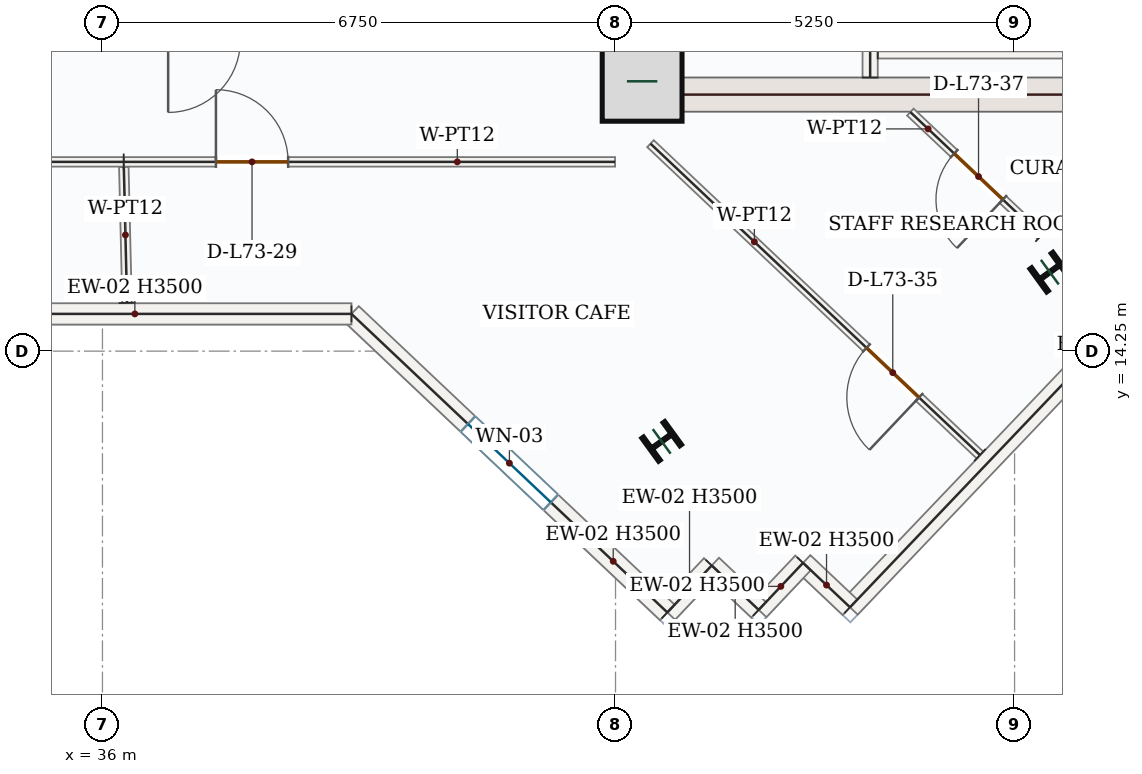
"""IFC4 building model, lengths in metres.
Left out: names, types, materials, properties, quantities, classifications, styles, units other than length and angle.
Written with IfcOpenShell. Run it as: python <this file> out.ifc"""

import sys

from ifc_helpers import new_model, si_unit, direction, frame, frame_2d, origin, origin_2d, place, context, subcontext, project, spatial, rectangle, i_section, extrude, source, transform, mapped, element, fill, save


model = new_model("IFC4")
c1 = context("Model", 3, precision=1e-05, world=origin(), true_north=direction((0.0, 1.0)))
c2 = subcontext(c1, "Body", "Model", "MODEL_VIEW")
j1 = project(units=[si_unit("LENGTHUNIT", "METRE"), si_unit("PLANEANGLEUNIT", "RADIAN")], contexts=[c1])
p1 = place(None, origin())
s1 = spatial("IfcSite", under=j1, at=p1, CompositionType="ELEMENT")
p2 = place(p1, origin())
s2 = spatial("IfcBuilding", under=s1, at=p2, CompositionType="ELEMENT")
p3 = place(p2, frame((0.0, 0.0, 302.85)))
s3 = spatial("IfcBuildingStorey", under=s2, at=p3, CompositionType="ELEMENT", Elevation=302.85)
p4 = place(p3, frame((42.975, 17.4, 0.0), z_axis=(0.0, 0.0, 1.0), x_axis=(0.0, 1.0, 0.0)))
e1 = element("IfcWall", 1, at=p4, inside=s3, PredefinedType="SHEAR", context=c2, shape_type="SweptSolid", body=[
    extrude(rectangle(XDim=8.55, YDim=0.45, at=frame_2d((4.275, 0.0))), origin(), (0.0, 0.0, 1.0), 3.5),
])
p5 = place(p4, frame((6.65, 0.0, 0.0)))
e2 = element("IfcOpeningElement", 2, at=p5, cuts=e1, PredefinedType="OPENING", context=c2, shape_type="SweptSolid", body=[
    extrude(rectangle(XDim=1.1, YDim=2.2, at=frame_2d((0.55, 1.1))), frame((0.0, 0.235, 0.0), z_axis=(0.0, -1.0, 0.0), x_axis=(1.0, 0.0, 0.0)), (0.0, 0.0, 1.0), 0.47),
])
p6 = place(p4, frame((1.75, 0.0, 0.0)))
e3 = element("IfcOpeningElement", 3, at=p6, cuts=e1, PredefinedType="OPENING", context=c2, shape_type="SweptSolid", body=[
    extrude(rectangle(XDim=1.3, YDim=2.2, at=frame_2d((0.65, 1.1))), frame((0.0, 0.235, 0.0), z_axis=(0.0, -1.0, 0.0), x_axis=(1.0, 0.0, 0.0)), (0.0, 0.0, 1.0), 0.47),
])
p7 = place(p4, frame((4.3, 0.0, 0.0)))
e4 = element("IfcOpeningElement", 4, at=p7, cuts=e1, PredefinedType="OPENING", context=c2, shape_type="SweptSolid", body=[
    extrude(rectangle(XDim=0.88, YDim=2.1, at=frame_2d((0.44, 1.05))), frame((0.0, 0.235, 0.0), z_axis=(0.0, -1.0, 0.0), x_axis=(1.0, 0.0, 0.0)), (0.0, 0.0, 1.0), 0.47),
])
m1 = source(origin(), c2, "Body", "SweptSolid", [
    extrude(rectangle(XDim=7.1, YDim=0.45, at=frame_2d((3.55, 0.0))), origin(), (0.0, 0.0, 1.0), 3.5),
])
p8 = place(p3, frame((43.2, 17.625, 0.0), z_axis=(0.0, 0.0, 1.0), x_axis=(1.0, 0.0, 0.0)))
e5 = element("IfcWall", 5, at=p8, inside=s3, PredefinedType="SHEAR", context=c2, shape_type="MappedRepresentation", body=[
    mapped(m1, transform((0.0, 0.0, 0.0), x_axis=(1.0, 0.0, 0.0), y_axis=(0.0, 1.0, 0.0), z_axis=(0.0, 0.0, 1.0), scale=1.0)),
])
m2 = source(origin(), c2, "Body", "SweptSolid", [
    extrude(rectangle(XDim=1.05, YDim=1.05, at=origin_2d()), origin(), (0.0, 0.0, 1.0), 3.75),
])
p9 = place(p3, frame((43.1, 17.8, 0.0), z_axis=(0.0, 0.0, 1.0), x_axis=(1.0, 0.0, 0.0)))
e6 = element("IfcColumn", 6, at=p9, inside=s3, PredefinedType="COLUMN", context=c2, shape_type="MappedRepresentation", body=[
    mapped(m2, transform((0.0, 0.0, 0.0), x_axis=(1.0, 0.0, 0.0), y_axis=(0.0, 1.0, 0.0), z_axis=(0.0, 0.0, 1.0), scale=1.0)),
])
m3 = source(origin(), c2, "Body", "SweptSolid", [
    extrude(i_section(OverallWidth=0.374, OverallDepth=0.372, WebThickness=0.016, FlangeThickness=0.026, FilletRadius=0.018, at=origin_2d()), origin(), (0.0, 0.0, 1.0), 3.75),
])
for number, where, z_axis, x_axis in (
    (7, (43.357, 13.063, 0.0), (0.0, 0.0, 1.0), (-0.588, 0.809, 0.0)),
    (8, (48.464, 15.289, 0.0), (0.0, 0.0, 1.0), (-0.588, 0.809, 0.0)),
):
    element("IfcColumn", number, at=place(p3, frame(where, z_axis=z_axis, x_axis=x_axis)), inside=s3, PredefinedType="COLUMN", context=c2, shape_type="MappedRepresentation", body=[
        mapped(m3, transform((0.0, 0.0, 0.0), x_axis=(1.0, 0.0, 0.0), y_axis=(0.0, 1.0, 0.0), z_axis=(0.0, 0.0, 1.0), scale=1.0)),
    ])
m4 = source(origin(), c2, "Body", "SweptSolid", [
    extrude(rectangle(XDim=10.47, YDim=0.28, at=frame_2d((5.235, 0.0))), origin(), (0.0, 0.0, 1.0), 3.5),
])
p10 = place(p3, frame((53.06, 18.458, 0.0), z_axis=(0.0, 0.0, 1.0), x_axis=(-0.690070788875, -0.723741878256, 0.0)))
e9 = element("IfcWall", 9, at=p10, inside=s3, PredefinedType="SOLIDWALL", context=c2, shape_type="MappedRepresentation", body=[
    mapped(m4, transform((0.0, 0.0, 0.0), x_axis=(1.0, 0.0, 0.0), y_axis=(0.0, 1.0, 0.0), z_axis=(0.0, 0.0, 1.0), scale=1.0)),
])
m5 = source(origin(), c2, "Body", "SweptSolid", [
    extrude(rectangle(XDim=0.85, YDim=0.28, at=frame_2d((0.425, 0.0))), origin(), (0.0, 0.0, 1.0), 3.5),
])
p11 = place(p3, frame((45.835, 10.88, 0.0), z_axis=(0.0, 0.0, 1.0), x_axis=(-0.726790047388, 0.686859685101, 0.0)))
e10 = element("IfcWall", 10, at=p11, inside=s3, PredefinedType="SOLIDWALL", context=c2, shape_type="MappedRepresentation", body=[
    mapped(m5, transform((0.0, 0.0, 0.0), x_axis=(1.0, 0.0, 0.0), y_axis=(0.0, 1.0, 0.0), z_axis=(0.0, 0.0, 1.0), scale=1.0)),
])
m6 = source(origin(), c2, "Body", "SweptSolid", [
    extrude(rectangle(XDim=0.85, YDim=0.28, at=frame_2d((0.425, 0.0))), origin(), (0.0, 0.0, 1.0), 3.5),
])
p12 = place(p3, frame((45.217, 11.464, 0.0), z_axis=(0.0, 0.0, 1.0), x_axis=(-0.687011382404, -0.726646654466, 0.0)))
e11 = element("IfcWall", 11, at=p12, inside=s3, PredefinedType="SOLIDWALL", context=c2, shape_type="MappedRepresentation", body=[
    mapped(m6, transform((0.0, 0.0, 0.0), x_axis=(1.0, 0.0, 0.0), y_axis=(0.0, 1.0, 0.0), z_axis=(0.0, 0.0, 1.0), scale=1.0)),
])
p13 = place(p3, frame((44.633, 10.846, 0.0), z_axis=(0.0, 0.0, 1.0), x_axis=(-0.726790047388, 0.686859685101, 0.0)))
e12 = element("IfcWall", 12, at=p13, inside=s3, PredefinedType="SOLIDWALL", context=c2, shape_type="MappedRepresentation", body=[
    mapped(m5, transform((0.0, 0.0, 0.0), x_axis=(1.0, 0.0, 0.0), y_axis=(0.0, 1.0, 0.0), z_axis=(0.0, 0.0, 1.0), scale=1.0)),
])
p14 = place(p3, frame((44.016, 11.43, 0.0), z_axis=(0.0, 0.0, 1.0), x_axis=(-0.687011382404, -0.726646654466, 0.0)))
e13 = element("IfcWall", 13, at=p14, inside=s3, PredefinedType="SOLIDWALL", context=c2, shape_type="MappedRepresentation", body=[
    mapped(m6, transform((0.0, 0.0, 0.0), x_axis=(1.0, 0.0, 0.0), y_axis=(0.0, 1.0, 0.0), z_axis=(0.0, 0.0, 1.0), scale=1.0)),
])
p15 = place(p3, frame((43.432, 10.812, 0.0), z_axis=(0.0, 0.0, 1.0), x_axis=(-0.726765623086, 0.686885528382, 0.0)))
e14 = element("IfcWall", 14, at=p15, inside=s3, PredefinedType="SOLIDWALL", context=c2, shape_type="SweptSolid", body=[
    extrude(rectangle(XDim=5.718, YDim=0.28, at=frame_2d((2.859, 0.0))), origin(), (0.0, 0.0, 1.0), 3.5),
])
p16 = place(p15, frame((2.109, 0.0, 0.85)))
e15 = element("IfcOpeningElement", 15, at=p16, cuts=e14, PredefinedType="OPENING", context=c2, shape_type="SweptSolid", body=[
    extrude(rectangle(XDim=1.5, YDim=1.5, at=frame_2d((0.75, 0.75))), frame((0.0, 0.15, 0.0), z_axis=(0.0, -1.0, 0.0), x_axis=(1.0, 0.0, 0.0)), (0.0, 0.0, 1.0), 0.3),
])
m7 = source(origin(), c2, "Body", "SweptSolid", [
    extrude(rectangle(XDim=5.699, YDim=0.28, at=frame_2d((2.85, 0.0))), origin(), (0.0, 0.0, 1.0), 3.5),
])
p17 = place(p3, frame((39.276, 14.74, 0.0), z_axis=(0.0, 0.0, 1.0), x_axis=(-1.0, 0.0, 0.0)))
e16 = element("IfcWall", 16, at=p17, inside=s3, PredefinedType="SOLIDWALL", context=c2, shape_type="MappedRepresentation", body=[
    mapped(m7, transform((0.0, 0.0, 0.0), x_axis=(1.0, 0.0, 0.0), y_axis=(0.0, 1.0, 0.0), z_axis=(0.0, 0.0, 1.0), scale=1.0)),
])
p18 = place(p3, frame((46.1, 17.85, 0.0), z_axis=(0.0, 0.0, 1.0), x_axis=(0.0, 1.0, 0.0)))
e17 = element("IfcWall", 17, at=p18, inside=s3, PredefinedType="SOLIDWALL", context=c2, shape_type="SweptSolid", body=[
    extrude(rectangle(XDim=8.0, YDim=0.2, at=frame_2d((4.0, 0.0))), origin(), (0.0, 0.0, 1.0), 3.5),
])
p19 = place(p18, frame((6.3, 0.0, 0.0)))
e18 = element("IfcOpeningElement", 18, at=p19, cuts=e17, PredefinedType="OPENING", context=c2, shape_type="SweptSolid", body=[
    extrude(rectangle(XDim=1.05, YDim=2.15, at=frame_2d((0.525, 1.075))), frame((0.0, 0.11, 0.0), z_axis=(0.0, -1.0, 0.0), x_axis=(1.0, 0.0, 0.0)), (0.0, 0.0, 1.0), 0.22),
])
m8 = source(origin(), c2, "Body", "SweptSolid", [
    extrude(rectangle(XDim=3.25, YDim=0.2, at=frame_2d((1.625, 0.0))), origin(), (0.0, 0.0, 1.0), 3.5),
])
p20 = place(p3, frame((46.2, 18.2, 0.0), z_axis=(0.0, 0.0, 1.0), x_axis=(1.0, 0.0, 0.0)))
e19 = element("IfcWall", 19, at=p20, inside=s3, PredefinedType="SOLIDWALL", context=c2, shape_type="MappedRepresentation", body=[
    mapped(m8, transform((0.0, 0.0, 0.0), x_axis=(1.0, 0.0, 0.0), y_axis=(0.0, 1.0, 0.0), z_axis=(0.0, 0.0, 1.0), scale=1.0)),
])
p21 = place(p3, frame((48.349, 15.769, 0.0), z_axis=(0.0, 0.0, 1.0), x_axis=(-0.726735597886, 0.686917295433, 0.0)))
e20 = element("IfcWall", 20, at=p21, inside=s3, PredefinedType="PARTITIONING", context=c2, shape_type="SweptSolid", body=[
    extrude(rectangle(XDim=2.367, YDim=0.125, at=frame_2d((1.183, 0.0))), origin(), (0.0, 0.0, 1.0), 3.5),
])
p22 = place(p21, frame((0.692, 0.0, 0.0)))
e21 = element("IfcOpeningElement", 21, at=p22, cuts=e20, PredefinedType="OPENING", context=c2, shape_type="SweptSolid", body=[
    extrude(rectangle(XDim=0.88, YDim=2.1, at=frame_2d((0.44, 1.05))), frame((0.0, 0.073, 0.0), z_axis=(0.0, -1.0, 0.0), x_axis=(1.0, 0.0, 0.0)), (0.0, 0.0, 1.0), 0.145),
])
p23 = place(p3, frame((47.544, 12.883, 0.0), z_axis=(0.0, 0.0, 1.0), x_axis=(-0.726761082497, 0.686890332562, 0.0)))
e22 = element("IfcWall", 22, at=p23, inside=s3, PredefinedType="PARTITIONING", context=c2, shape_type="SweptSolid", body=[
    extrude(rectangle(XDim=5.964, YDim=0.125, at=frame_2d((2.982, 0.0))), origin(), (0.0, 0.0, 1.0), 3.5),
])
p24 = place(p23, frame((1.103, 0.0, 0.0)))
e23 = element("IfcOpeningElement", 23, at=p24, cuts=e22, PredefinedType="OPENING", context=c2, shape_type="SweptSolid", body=[
    extrude(rectangle(XDim=0.95, YDim=2.15, at=frame_2d((0.475, 1.075))), frame((0.0, 0.073, 0.0), z_axis=(0.0, -1.0, 0.0), x_axis=(1.0, 0.0, 0.0)), (0.0, 0.0, 1.0), 0.145),
])
p25 = place(p3, frame((36.28, 16.74, 0.0), z_axis=(0.0, 0.0, 1.0), x_axis=(1.0, 0.0, 0.0)))
e24 = element("IfcWall", 24, at=p25, inside=s3, PredefinedType="PARTITIONING", context=c2, shape_type="SweptSolid", body=[
    extrude(rectangle(XDim=6.464, YDim=0.125, at=frame_2d((3.232, 0.0))), origin(), (0.0, 0.0, 1.0), 3.5),
])
p26 = place(p25, frame((1.213, 0.0, 0.0)))
e25 = element("IfcOpeningElement", 25, at=p26, cuts=e24, PredefinedType="OPENING", context=c2, shape_type="SweptSolid", body=[
    extrude(rectangle(XDim=0.95, YDim=2.15, at=frame_2d((0.475, 1.075))), frame((0.0, 0.073, 0.0), z_axis=(0.0, -1.0, 0.0), x_axis=(1.0, 0.0, 0.0)), (0.0, 0.0, 1.0), 0.145),
])
m9 = source(origin(), c2, "Body", "SweptSolid", [
    extrude(rectangle(XDim=1.788, YDim=0.125, at=frame_2d((0.894, 0.0))), origin(), (0.0, 0.0, 1.0), 3.5),
])
p27 = place(p3, frame((36.323, 14.885, 0.0), z_axis=(0.0, 0.0, 1.0), x_axis=(-0.023484370815, 0.999724204132, 0.0)))
e26 = element("IfcWall", 26, at=p27, inside=s3, PredefinedType="PARTITIONING", context=c2, shape_type="MappedRepresentation", body=[
    mapped(m9, transform((0.0, 0.0, 0.0), x_axis=(1.0, 0.0, 0.0), y_axis=(0.0, 1.0, 0.0), z_axis=(0.0, 0.0, 1.0), scale=1.0)),
])
p28 = place(p3, frame((29.399, 16.74, 0.0), z_axis=(0.0, 0.0, 1.0), x_axis=(1.0, 0.0, 0.0)))
e27 = element("IfcWall", 27, at=p28, inside=s3, PredefinedType="PARTITIONING", context=c2, shape_type="SweptSolid", body=[
    extrude(rectangle(XDim=6.881, YDim=0.125, at=frame_2d((3.44, 0.0))), origin(), (0.0, 0.0, 1.0), 3.5),
])
p29 = place(p28, frame((4.626, 0.0, 0.0)))
e28 = element("IfcOpeningElement", 28, at=p29, cuts=e27, PredefinedType="OPENING", context=c2, shape_type="SweptSolid", body=[
    extrude(rectangle(XDim=0.95, YDim=2.15, at=frame_2d((0.475, 1.075))), frame((0.0, 0.073, 0.0), z_axis=(0.0, -1.0, 0.0), x_axis=(1.0, 0.0, 0.0)), (0.0, 0.0, 1.0), 0.145),
])
m10 = source(origin(), c2, "Body", "SweptSolid", [
    extrude(rectangle(XDim=1.5, YDim=1.5, at=frame_2d((0.75, 0.75))), frame((0.0, 0.03, 0.0), z_axis=(0.0, -1.0, 0.0), x_axis=(1.0, 0.0, 0.0)), (0.0, 0.0, 1.0), 0.06),
])
p30 = place(p16, origin())
e29 = element("IfcWindow", 29, at=p30, inside=s3, PartitioningType="SINGLE_PANEL", PredefinedType="WINDOW", context=c2, shape_type="MappedRepresentation", body=[
    mapped(m10, transform((0.0, 0.0, 0.0), x_axis=(1.0, 0.0, 0.0), y_axis=(0.0, 1.0, 0.0), z_axis=(0.0, 0.0, 1.0), scale=1.0)),
])
fill(e15, e29)
m11 = source(origin(), c2, "Body", "SweptSolid", [
    extrude(rectangle(XDim=0.95, YDim=2.15, at=frame_2d((0.475, 1.075))), frame((0.0, 0.025, 0.0), z_axis=(0.0, -1.0, 0.0), x_axis=(1.0, 0.0, 0.0)), (0.0, 0.0, 1.0), 0.05),
])
p31 = place(p26, origin())
e30 = element("IfcDoor", 30, at=p31, inside=s3, OperationType="SINGLE_SWING_LEFT", PredefinedType="DOOR", context=c2, shape_type="MappedRepresentation", body=[
    mapped(m11, transform((0.0, 0.0, 0.0), x_axis=(1.0, 0.0, 0.0), y_axis=(0.0, 1.0, 0.0), z_axis=(0.0, 0.0, 1.0), scale=1.0)),
])
fill(e25, e30)
p32 = place(p24, origin())
e31 = element("IfcDoor", 31, at=p32, inside=s3, OperationType="SINGLE_SWING_LEFT", PredefinedType="DOOR", context=c2, shape_type="MappedRepresentation", body=[
    mapped(m11, transform((0.0, 0.0, 0.0), x_axis=(1.0, 0.0, 0.0), y_axis=(0.0, 1.0, 0.0), z_axis=(0.0, 0.0, 1.0), scale=1.0)),
])
fill(e23, e31)
m12 = source(origin(), c2, "Body", "SweptSolid", [
    extrude(rectangle(XDim=0.88, YDim=2.1, at=frame_2d((0.44, 1.05))), frame((0.0, 0.025, 0.0), z_axis=(0.0, -1.0, 0.0), x_axis=(1.0, 0.0, 0.0)), (0.0, 0.0, 1.0), 0.05),
])
p33 = place(p22, origin())
e32 = element("IfcDoor", 32, at=p33, inside=s3, OperationType="SINGLE_SWING_LEFT", PredefinedType="DOOR", context=c2, shape_type="MappedRepresentation", body=[
    mapped(m12, transform((0.0, 0.0, 0.0), x_axis=(1.0, 0.0, 0.0), y_axis=(0.0, 1.0, 0.0), z_axis=(0.0, 0.0, 1.0), scale=1.0)),
])
fill(e21, e32)
save(model, sys.argv[1])
